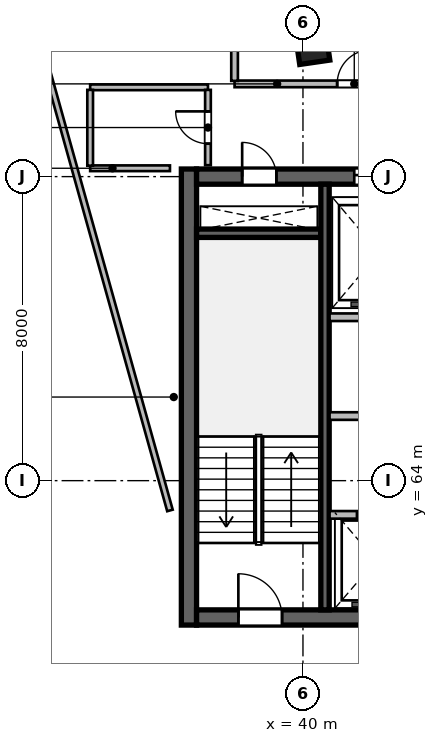
"""IFC4 building model, lengths in metres.
Left out: names, types, materials, properties, quantities, classifications, styles, units other than length and angle.
Written with IfcOpenShell. Run it as: python <this file> out.ifc"""

import sys

from ifc_helpers import new_model, si_unit, direction, frame, frame_2d, origin, origin_2d, place, context, subcontext, project, spatial, rectangle, extrude, source, transform, mapped, element, fill, save


model = new_model("IFC4")
c1 = context("Model", 3, precision=1e-05, world=origin(), true_north=direction((0.0, 1.0)))
c2 = subcontext(c1, "Body", "Model", "MODEL_VIEW")
j1 = project(units=[si_unit("LENGTHUNIT", "METRE"), si_unit("PLANEANGLEUNIT", "RADIAN")], contexts=[c1])
p1 = place(None, origin())
s1 = spatial("IfcSite", under=j1, at=p1, CompositionType="ELEMENT")
p2 = place(p1, origin())
s2 = spatial("IfcBuilding", under=s1, at=p2, CompositionType="ELEMENT")
p3 = place(p2, frame((0.0, 0.0, 271.8)))
s3 = spatial("IfcBuildingStorey", under=s2, at=p3, CompositionType="ELEMENT", Elevation=271.8)
m1 = source(origin(), c2, "Body", "SweptSolid", [
    extrude(rectangle(XDim=12.0, YDim=0.4, at=frame_2d((6.0, 0.0))), origin(), (0.0, 0.0, 1.0), 3.9),
])
p4 = place(p3, frame((37.0, 60.2, 0.0), z_axis=(0.0, 0.0, 1.0), x_axis=(0.0, 1.0, 0.0)))
e1 = element("IfcWall", 1, at=p4, inside=s3, PredefinedType="SHEAR", context=c2, shape_type="MappedRepresentation", body=[
    mapped(m1, transform((0.0, 0.0, 0.0), scale=1.0)),
])
m2 = source(origin(), c2, "Body", "SweptSolid", [
    extrude(rectangle(XDim=21.6, YDim=0.4, at=frame_2d((10.8, 0.0))), origin(), (0.0, 0.0, 1.0), 3.9),
])
p5 = place(p3, frame((37.2, 60.4, 0.0), z_axis=(0.0, 0.0, 1.0), x_axis=(1.0, 0.0, 0.0)))
e2 = element("IfcWall", 2, at=p5, inside=s3, PredefinedType="SHEAR", context=c2, shape_type="MappedRepresentation", body=[
    mapped(m2, transform((0.0, 0.0, 0.0), scale=1.0)),
])
p6 = place(p5, frame((1.1, 0.0, 0.0)))
e3 = element("IfcOpeningElement", 3, at=p6, cuts=e2, PredefinedType="OPENING", context=c2, shape_type="SweptSolid", body=[
    extrude(rectangle(XDim=1.15, YDim=2.15, at=frame_2d((0.575, 1.075))), frame((0.0, 0.21, 0.0), z_axis=(0.0, -1.0, 0.0), x_axis=(1.0, 0.0, 0.0)), (0.0, 0.0, 1.0), 0.42),
])
p7 = place(p5, frame((19.5, 0.0, 0.0)))
e4 = element("IfcOpeningElement", 4, at=p7, cuts=e2, PredefinedType="OPENING", context=c2, shape_type="SweptSolid", body=[
    extrude(rectangle(XDim=0.9, YDim=2.1, at=frame_2d((0.45, 1.05))), frame((0.0, 0.21, 0.0), z_axis=(0.0, -1.0, 0.0), x_axis=(1.0, 0.0, 0.0)), (0.0, 0.0, 1.0), 0.42),
])
p8 = place(p5, frame((12.02, 0.0, 0.0)))
e5 = element("IfcOpeningElement", 5, at=p8, cuts=e2, PredefinedType="OPENING", context=c2, shape_type="SweptSolid", body=[
    extrude(rectangle(XDim=1.6, YDim=2.15, at=frame_2d((0.8, 1.075))), frame((0.0, 0.21, 0.0), z_axis=(0.0, -1.0, 0.0), x_axis=(1.0, 0.0, 0.0)), (0.0, 0.0, 1.0), 0.42),
])
p9 = place(p3, frame((37.2, 72.0, 0.0), z_axis=(0.0, 0.0, 1.0), x_axis=(1.0, 0.0, 0.0)))
e6 = element("IfcWall", 6, at=p9, inside=s3, PredefinedType="SHEAR", context=c2, shape_type="MappedRepresentation", body=[
    mapped(m2, transform((0.0, 0.0, 0.0), scale=1.0)),
])
p10 = place(p9, frame((1.2, 0.0, 0.0)))
e7 = element("IfcOpeningElement", 7, at=p10, cuts=e6, PredefinedType="OPENING", context=c2, shape_type="SweptSolid", body=[
    extrude(rectangle(XDim=0.9, YDim=2.1, at=frame_2d((0.45, 1.05))), frame((0.0, 0.21, 0.0), z_axis=(0.0, -1.0, 0.0), x_axis=(1.0, 0.0, 0.0)), (0.0, 0.0, 1.0), 0.42),
])
p11 = place(p9, frame((14.7, 0.0, 0.0)))
e8 = element("IfcOpeningElement", 8, at=p11, cuts=e6, PredefinedType="OPENING", context=c2, shape_type="SweptSolid", body=[
    extrude(rectangle(XDim=1.2, YDim=2.15, at=frame_2d((0.6, 1.075))), frame((0.0, 0.21, 0.0), z_axis=(0.0, -1.0, 0.0), x_axis=(1.0, 0.0, 0.0)), (0.0, 0.0, 1.0), 0.42),
])
p12 = place(p9, frame((4.15, 0.0, 0.0)))
e9 = element("IfcOpeningElement", 9, at=p12, cuts=e6, PredefinedType="OPENING", context=c2, shape_type="SweptSolid", body=[
    extrude(rectangle(XDim=1.3, YDim=2.15, at=frame_2d((0.65, 1.075))), frame((0.0, 0.21, 0.0), z_axis=(0.0, -1.0, 0.0), x_axis=(1.0, 0.0, 0.0)), (0.0, 0.0, 1.0), 0.42),
])
p13 = place(p9, frame((6.76, 0.0, 0.0)))
e10 = element("IfcOpeningElement", 10, at=p13, cuts=e6, PredefinedType="OPENING", context=c2, shape_type="SweptSolid", body=[
    extrude(rectangle(XDim=0.85, YDim=2.1, at=frame_2d((0.425, 1.05))), frame((0.0, 0.21, 0.0), z_axis=(0.0, -1.0, 0.0), x_axis=(1.0, 0.0, 0.0)), (0.0, 0.0, 1.0), 0.42),
])
p14 = place(p9, frame((8.76, 0.0, 0.0)))
e11 = element("IfcOpeningElement", 11, at=p14, cuts=e6, PredefinedType="OPENING", context=c2, shape_type="SweptSolid", body=[
    extrude(rectangle(XDim=0.85, YDim=2.1, at=frame_2d((0.425, 1.05))), frame((0.0, 0.21, 0.0), z_axis=(0.0, -1.0, 0.0), x_axis=(1.0, 0.0, 0.0)), (0.0, 0.0, 1.0), 0.42),
])
p15 = place(p9, frame((10.725, 0.0, 0.0)))
e12 = element("IfcOpeningElement", 12, at=p15, cuts=e6, PredefinedType="OPENING", context=c2, shape_type="SweptSolid", body=[
    extrude(rectangle(XDim=0.85, YDim=2.1, at=frame_2d((0.425, 1.05))), frame((0.0, 0.21, 0.0), z_axis=(0.0, -1.0, 0.0), x_axis=(1.0, 0.0, 0.0)), (0.0, 0.0, 1.0), 0.42),
])
m3 = source(origin(), c2, "Body", "SweptSolid", [
    extrude(rectangle(XDim=3.27, YDim=0.22, at=frame_2d((1.635, 0.0))), origin(), (0.0, 0.0, 1.0), 3.9),
])
p16 = place(p3, frame((37.2, 70.51, 0.0), z_axis=(0.0, 0.0, 1.0), x_axis=(1.0, 0.0, 0.0)))
e13 = element("IfcWall", 13, at=p16, inside=s3, PredefinedType="SHEAR", context=c2, shape_type="MappedRepresentation", body=[
    mapped(m3, transform((0.0, 0.0, 0.0), scale=1.0)),
])
m4 = source(origin(), c2, "Body", "SweptSolid", [
    extrude(rectangle(XDim=11.2, YDim=0.22, at=frame_2d((5.6, 0.0))), origin(), (0.0, 0.0, 1.0), 3.9),
])
p17 = place(p3, frame((40.58, 60.6, 0.0), z_axis=(0.0, 0.0, 1.0), x_axis=(0.0, 1.0, 0.0)))
e14 = element("IfcWall", 14, at=p17, inside=s3, PredefinedType="SHEAR", context=c2, shape_type="MappedRepresentation", body=[
    mapped(m4, transform((0.0, 0.0, 0.0), scale=1.0)),
])
m5 = source(origin(), c2, "Body", "SweptSolid", [
    extrude(rectangle(XDim=0.8, YDim=0.8, at=origin_2d()), origin(), (0.0, 0.0, 1.0), 3.9),
])
p18 = place(p3, frame((40.253, 75.404, 0.0), z_axis=(0.0, 0.0, 1.0), x_axis=(-0.143492621991, 0.98965138682, 0.0)))
e15 = element("IfcColumn", 15, at=p18, inside=s3, PredefinedType="COLUMN", context=c2, shape_type="MappedRepresentation", body=[
    mapped(m5, transform((0.0, 0.0, 0.0), scale=1.0)),
])
m6 = source(origin(), c2, "Body", "SweptSolid", [
    extrude(rectangle(XDim=8.8, YDim=0.2, at=frame_2d((4.4, 0.0))), origin(), (0.0, 0.0, 1.0), 3.64),
])
p19 = place(p3, frame((40.7, 68.3, 0.0), z_axis=(0.0, 0.0, 1.0), x_axis=(1.0, 0.0, 0.0)))
e16 = element("IfcWall", 16, at=p19, inside=s3, PredefinedType="SOLIDWALL", context=c2, shape_type="MappedRepresentation", body=[
    mapped(m6, transform((0.0, 0.0, 0.0), scale=1.0)),
])
m7 = source(origin(), c2, "Body", "SweptSolid", [
    extrude(rectangle(XDim=8.02, YDim=0.2, at=frame_2d((4.01, 0.0))), origin(), (0.0, 0.0, 1.0), 3.64),
])
p20 = place(p3, frame((40.7, 63.1, 0.0), z_axis=(0.0, 0.0, 1.0), x_axis=(1.0, 0.0, 0.0)))
e17 = element("IfcWall", 17, at=p20, inside=s3, PredefinedType="SOLIDWALL", context=c2, shape_type="MappedRepresentation", body=[
    mapped(m7, transform((0.0, 0.0, 0.0), scale=1.0)),
])
p21 = place(p20, frame((0.72, 0.0, 0.0)))
e18 = element("IfcOpeningElement", 18, at=p21, cuts=e17, PredefinedType="OPENING", context=c2, shape_type="SweptSolid", body=[
    extrude(rectangle(XDim=1.0, YDim=2.15, at=frame_2d((0.5, 1.075))), frame((0.0, 0.11, 0.0), z_axis=(0.0, -1.0, 0.0), x_axis=(1.0, 0.0, 0.0)), (0.0, 0.0, 1.0), 0.22),
])
p22 = place(p20, frame((2.62, 0.0, 0.0)))
e19 = element("IfcOpeningElement", 19, at=p22, cuts=e17, PredefinedType="OPENING", context=c2, shape_type="SweptSolid", body=[
    extrude(rectangle(XDim=1.0, YDim=2.15, at=frame_2d((0.5, 1.075))), frame((0.0, 0.11, 0.0), z_axis=(0.0, -1.0, 0.0), x_axis=(1.0, 0.0, 0.0)), (0.0, 0.0, 1.0), 0.22),
])
p23 = place(p20, frame((4.55, 0.0, 0.0)))
e20 = element("IfcOpeningElement", 20, at=p23, cuts=e17, PredefinedType="OPENING", context=c2, shape_type="SweptSolid", body=[
    extrude(rectangle(XDim=1.0, YDim=2.15, at=frame_2d((0.5, 1.075))), frame((0.0, 0.11, 0.0), z_axis=(0.0, -1.0, 0.0), x_axis=(1.0, 0.0, 0.0)), (0.0, 0.0, 1.0), 0.22),
])
p24 = place(p20, frame((6.55, 0.0, 0.0)))
e21 = element("IfcOpeningElement", 21, at=p24, cuts=e17, PredefinedType="OPENING", context=c2, shape_type="SweptSolid", body=[
    extrude(rectangle(XDim=1.0, YDim=2.15, at=frame_2d((0.5, 1.075))), frame((0.0, 0.11, 0.0), z_axis=(0.0, -1.0, 0.0), x_axis=(1.0, 0.0, 0.0)), (0.0, 0.0, 1.0), 0.22),
])
p25 = place(p3, frame((40.7, 65.7, 0.0), z_axis=(0.0, 0.0, 1.0), x_axis=(1.0, 0.0, 0.0)))
e22 = element("IfcWall", 22, at=p25, inside=s3, PredefinedType="SOLIDWALL", context=c2, shape_type="MappedRepresentation", body=[
    mapped(m6, transform((0.0, 0.0, 0.0), scale=1.0)),
])
p26 = place(p25, frame((3.8, 0.0, 0.0)))
e23 = element("IfcOpeningElement", 23, at=p26, cuts=e22, PredefinedType="OPENING", context=c2, shape_type="SweptSolid", body=[
    extrude(rectangle(XDim=0.95, YDim=2.15, at=frame_2d((0.475, 1.075))), frame((0.0, 0.11, 0.0), z_axis=(0.0, -1.0, 0.0), x_axis=(1.0, 0.0, 0.0)), (0.0, 0.0, 1.0), 0.22),
])
m8 = source(origin(), c2, "Body", "SweptSolid", [
    extrude(rectangle(XDim=2.1, YDim=0.15, at=frame_2d((1.05, 0.0))), origin(), (0.0, 0.0, 1.0), 3.64),
])
p27 = place(p3, frame((34.4, 72.22, 0.0), z_axis=(0.0, 0.0, 1.0), x_axis=(1.0, 0.0, 0.0)))
e24 = element("IfcWall", 24, at=p27, inside=s3, PredefinedType="PARTITIONING", context=c2, shape_type="MappedRepresentation", body=[
    mapped(m8, transform((0.0, 0.0, 0.0), scale=1.0)),
])
m9 = source(origin(), c2, "Body", "SweptSolid", [
    extrude(rectangle(XDim=3.1, YDim=0.15, at=frame_2d((1.55, 0.0))), origin(), (0.0, 0.0, 1.0), 3.071),
])
p28 = place(p3, frame((34.4, 74.35, 0.0), z_axis=(0.0, 0.0, 1.0), x_axis=(1.0, 0.0, 0.0)))
e25 = element("IfcWall", 25, at=p28, inside=s3, PredefinedType="PARTITIONING", context=c2, shape_type="MappedRepresentation", body=[
    mapped(m9, transform((0.0, 0.0, 0.0), scale=1.0)),
])
m10 = source(origin(), c2, "Body", "SweptSolid", [
    extrude(rectangle(XDim=1.995, YDim=0.15, at=frame_2d((0.998, 0.0))), origin(), (0.0, 0.0, 1.0), 3.64),
])
p29 = place(p3, frame((34.4, 72.288, 0.0), z_axis=(0.0, 0.0, 1.0), x_axis=(0.0, 1.0, 0.0)))
e26 = element("IfcWall", 26, at=p29, inside=s3, PredefinedType="PARTITIONING", context=c2, shape_type="MappedRepresentation", body=[
    mapped(m10, transform((0.0, 0.0, 0.0), scale=1.0)),
])
m11 = source(origin(), c2, "Body", "SweptSolid", [
    extrude(rectangle(XDim=1.982, YDim=0.15, at=frame_2d((0.991, 0.0))), origin(), (0.0, 0.0, 1.0), 3.64),
])
p30 = place(p3, frame((37.5, 72.3, 0.0), z_axis=(0.0, 0.0, 1.0), x_axis=(0.0, 1.0, 0.0)))
e27 = element("IfcWall", 27, at=p30, inside=s3, PredefinedType="PARTITIONING", context=c2, shape_type="MappedRepresentation", body=[
    mapped(m11, transform((0.0, 0.0, 0.0), scale=1.0)),
])
p31 = place(p30, frame((0.566, 0.0, 0.0)))
e28 = element("IfcOpeningElement", 28, at=p31, cuts=e27, PredefinedType="OPENING", context=c2, shape_type="SweptSolid", body=[
    extrude(rectangle(XDim=0.85, YDim=2.1, at=frame_2d((0.425, 1.05))), frame((0.0, 0.085, 0.0), z_axis=(0.0, -1.0, 0.0), x_axis=(1.0, 0.0, 0.0)), (0.0, 0.0, 1.0), 0.17),
])
m12 = source(origin(), c2, "Body", "SweptSolid", [
    extrude(rectangle(XDim=4.0, YDim=0.175, at=frame_2d((2.0, 0.0))), origin(), (0.0, 0.0, 1.0), 3.64),
])
p32 = place(p3, frame((38.2, 74.44, 0.0), z_axis=(0.0, 0.0, 1.0), x_axis=(1.0, 0.0, 0.0)))
e29 = element("IfcWall", 29, at=p32, inside=s3, PredefinedType="PARTITIONING", context=c2, shape_type="MappedRepresentation", body=[
    mapped(m12, transform((0.0, 0.0, 0.0), scale=1.0)),
])
p33 = place(p32, frame((2.7, 0.0, 0.0)))
e30 = element("IfcOpeningElement", 30, at=p33, cuts=e29, PredefinedType="OPENING", context=c2, shape_type="SweptSolid", body=[
    extrude(rectangle(XDim=0.9, YDim=2.08, at=frame_2d((0.45, 1.04))), frame((0.0, 0.098, 0.0), z_axis=(0.0, -1.0, 0.0), x_axis=(1.0, 0.0, 0.0)), (0.0, 0.0, 1.0), 0.195),
])
m13 = source(origin(), c2, "Body", "SweptSolid", [
    extrude(rectangle(XDim=2.403, YDim=0.175, at=frame_2d((1.201, 0.0))), origin(), (0.0, 0.0, 1.0), 3.64),
])
p34 = place(p3, frame((38.2, 74.519, 0.0), z_axis=(0.0, 0.0, 1.0), x_axis=(0.0, 1.0, 0.0)))
e31 = element("IfcWall", 31, at=p34, inside=s3, PredefinedType="PARTITIONING", context=c2, shape_type="MappedRepresentation", body=[
    mapped(m13, transform((0.0, 0.0, 0.0), scale=1.0)),
])
m14 = source(origin(), c2, "Body", "SweptSolid", [
    extrude(rectangle(XDim=12.909, YDim=0.15, at=frame_2d((6.454, 0.0))), origin(), (0.0, 0.0, 1.0), 3.64),
])
p35 = place(p3, frame((36.5, 63.216, 0.0), z_axis=(0.0, 0.0, 1.0), x_axis=(-0.268750817191, 0.963209737419, 0.0)))
e32 = element("IfcWall", 32, at=p35, inside=s3, PredefinedType="PARTITIONING", context=c2, shape_type="MappedRepresentation", body=[
    mapped(m14, transform((0.0, 0.0, 0.0), scale=1.0)),
])
m15 = source(origin(), c2, "Body", "SweptSolid", [
    extrude(rectangle(XDim=1.15, YDim=2.15, at=frame_2d((0.575, 1.075))), frame((0.0, 0.025, 0.0), z_axis=(0.0, -1.0, 0.0), x_axis=(1.0, 0.0, 0.0)), (0.0, 0.0, 1.0), 0.05),
])
p36 = place(p6, origin())
e33 = element("IfcDoor", 33, at=p36, inside=s3, OperationType="SINGLE_SWING_LEFT", PredefinedType="DOOR", context=c2, shape_type="MappedRepresentation", body=[
    mapped(m15, transform((0.0, 0.0, 0.0), scale=1.0)),
])
fill(e3, e33)
m16 = source(origin(), c2, "Body", "SweptSolid", [
    extrude(rectangle(XDim=0.9, YDim=2.1, at=frame_2d((0.45, 1.05))), frame((0.0, 0.025, 0.0), z_axis=(0.0, -1.0, 0.0), x_axis=(1.0, 0.0, 0.0)), (0.0, 0.0, 1.0), 0.05),
])
p37 = place(p10, origin())
e34 = element("IfcDoor", 34, at=p37, inside=s3, OperationType="SINGLE_SWING_LEFT", PredefinedType="DOOR", context=c2, shape_type="MappedRepresentation", body=[
    mapped(m16, transform((0.0, 0.0, 0.0), scale=1.0)),
])
fill(e7, e34)
m17 = source(origin(), c2, "Body", "SweptSolid", [
    extrude(rectangle(XDim=1.3, YDim=2.15, at=frame_2d((0.65, 1.075))), frame((0.0, 0.025, 0.0), z_axis=(0.0, -1.0, 0.0), x_axis=(1.0, 0.0, 0.0)), (0.0, 0.0, 1.0), 0.05),
])
p38 = place(p12, origin())
e35 = element("IfcDoor", 35, at=p38, inside=s3, OperationType="DOUBLE_DOOR_SLIDING", PredefinedType="DOOR", context=c2, shape_type="MappedRepresentation", body=[
    mapped(m17, transform((0.0, 0.0, 0.0), scale=1.0)),
])
fill(e9, e35)
m18 = source(origin(), c2, "Body", "SweptSolid", [
    extrude(rectangle(XDim=1.0, YDim=2.15, at=frame_2d((0.5, 1.075))), frame((0.0, 0.025, 0.0), z_axis=(0.0, -1.0, 0.0), x_axis=(1.0, 0.0, 0.0)), (0.0, 0.0, 1.0), 0.05),
])
p39 = place(p21, origin())
e36 = element("IfcDoor", 36, at=p39, inside=s3, OperationType="DOUBLE_DOOR_SLIDING", PredefinedType="DOOR", context=c2, shape_type="MappedRepresentation", body=[
    mapped(m18, transform((0.0, 0.0, 0.0), scale=1.0)),
])
fill(e18, e36)
m19 = source(origin(), c2, "Body", "SweptSolid", [
    extrude(rectangle(XDim=0.85, YDim=2.1, at=frame_2d((0.425, 1.05))), frame((0.0, 0.025, 0.0), z_axis=(0.0, -1.0, 0.0), x_axis=(1.0, 0.0, 0.0)), (0.0, 0.0, 1.0), 0.05),
])
p40 = place(p31, origin())
e37 = element("IfcDoor", 37, at=p40, inside=s3, OperationType="SINGLE_SWING_RIGHT", PredefinedType="DOOR", context=c2, shape_type="MappedRepresentation", body=[
    mapped(m19, transform((0.0, 0.0, 0.0), scale=1.0)),
])
fill(e28, e37)
m20 = source(origin(), c2, "Body", "SweptSolid", [
    extrude(rectangle(XDim=0.9, YDim=2.08, at=frame_2d((0.45, 1.04))), frame((0.0, 0.025, 0.0), z_axis=(0.0, -1.0, 0.0), x_axis=(1.0, 0.0, 0.0)), (0.0, 0.0, 1.0), 0.05),
])
p41 = place(p33, origin())
e38 = element("IfcDoor", 38, at=p41, inside=s3, OperationType="SINGLE_SWING_RIGHT", PredefinedType="DOOR", context=c2, shape_type="MappedRepresentation", body=[
    mapped(m20, transform((0.0, 0.0, 0.0), scale=1.0)),
])
fill(e30, e38)
save(model, sys.argv[1])
